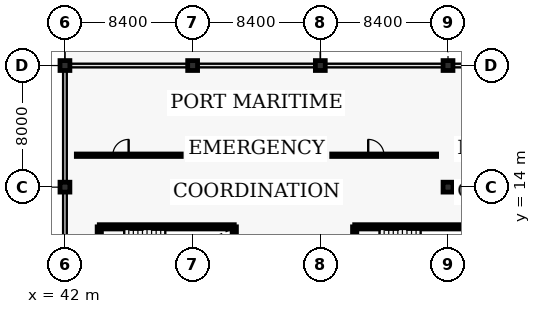
"""IFC4 building model, lengths in metres.
Left out: names, types, materials, properties, quantities, classifications, styles, units other than length and angle.
Written with IfcOpenShell. Run it as: python <this file> out.ifc"""

import sys

from ifc_helpers import new_model, si_unit, direction, frame, frame_2d, origin, origin_2d, place, context, subcontext, project, spatial, rectangle, extrude, element, fill, save


model = new_model("IFC4")
c1 = context("Model", 3, precision=1e-05, world=origin(), true_north=direction((0.0, 1.0)))
c2 = subcontext(c1, "Body", "Model", "MODEL_VIEW")
j1 = project(units=[si_unit("LENGTHUNIT", "METRE"), si_unit("PLANEANGLEUNIT", "RADIAN")], contexts=[c1])
p1 = place(None, origin())
s1 = spatial("IfcSite", under=j1, at=p1, CompositionType="ELEMENT")
p2 = place(p1, origin())
s2 = spatial("IfcBuilding", under=s1, at=p2, CompositionType="ELEMENT")
p3 = place(p2, frame((0.0, 0.0, 13.12)))
s3 = spatial("IfcBuildingStorey", under=s2, at=p3, CompositionType="ELEMENT", Elevation=13.12)
for number, where, z_axis, x_axis in (
    (1, (42.0, 14.0, 0.0), (0.0, 0.0, 1.0), (1.0, 0.0, 0.0)),
    (2, (42.0, 22.0, 0.0), (0.0, 0.0, 1.0), (1.0, 0.0, 0.0)),
    (3, (50.4, 14.0, 0.0), (0.0, 0.0, 1.0), (1.0, 0.0, 0.0)),
    (4, (50.4, 22.0, 0.0), (0.0, 0.0, 1.0), (1.0, 0.0, 0.0)),
    (5, (58.8, 14.0, 0.0), (0.0, 0.0, 1.0), (1.0, 0.0, 0.0)),
    (6, (58.8, 22.0, 0.0), (0.0, 0.0, 1.0), (1.0, 0.0, 0.0)),
    (7, (67.2, 14.0, 0.0), (0.0, 0.0, 1.0), (1.0, 0.0, 0.0)),
    (8, (67.2, 22.0, 0.0), (0.0, 0.0, 1.0), (1.0, 0.0, 0.0)),
):
    element("IfcColumn", number, at=place(p3, frame(where, z_axis=z_axis, x_axis=x_axis)), inside=s3, PredefinedType="COLUMN", context=c2, shape_type="SweptSolid", body=[
        extrude(rectangle(XDim=0.65, YDim=0.65, at=origin_2d()), origin(), (0.0, 0.0, 1.0), 3.2),
    ])
p4 = place(p3, frame((44.26, 11.39, 0.0), z_axis=(0.0, 0.0, 1.0), x_axis=(1.0, 0.0, 0.0)))
e9 = element("IfcWall", 9, at=p4, inside=s3, PredefinedType="SHEAR", context=c2, shape_type="SweptSolid", body=[
    extrude(rectangle(XDim=8.88, YDim=0.28, at=frame_2d((4.44, 0.0))), origin(), (0.0, 0.0, 1.0), 3.2),
])
p5 = place(p3, frame((44.26, 11.39, 0.0), z_axis=(0.0, 0.0, 1.0), x_axis=(0.0, -1.0, 0.0)))
e10 = element("IfcWall", 10, at=p5, inside=s3, PredefinedType="SHEAR", context=c2, shape_type="SweptSolid", body=[
    extrude(rectangle(XDim=3.43, YDim=0.28, at=frame_2d((1.715, 0.0))), origin(), (0.0, 0.0, 1.0), 3.2),
])
p6 = place(p5, frame((1.035, 0.0, 0.0)))
e11 = element("IfcOpeningElement", 11, at=p6, cuts=e10, PredefinedType="OPENING", context=c2, shape_type="SweptSolid", body=[
    extrude(rectangle(XDim=1.36, YDim=2.15, at=frame_2d((0.68, 1.075))), frame((0.0, 0.15, 0.0), z_axis=(0.0, -1.0, 0.0), x_axis=(1.0, 0.0, 0.0)), (0.0, 0.0, 1.0), 0.3),
])
p7 = place(p3, frame((53.14, 7.96, 0.0), z_axis=(0.0, 0.0, 1.0), x_axis=(0.0, 1.0, 0.0)))
e12 = element("IfcWall", 12, at=p7, inside=s3, PredefinedType="SHEAR", context=c2, shape_type="SweptSolid", body=[
    extrude(rectangle(XDim=3.43, YDim=0.28, at=frame_2d((1.715, 0.0))), origin(), (0.0, 0.0, 1.0), 3.2),
])
p8 = place(p3, frame((61.06, 11.39, 0.0), z_axis=(0.0, 0.0, 1.0), x_axis=(1.0, 0.0, 0.0)))
e13 = element("IfcWall", 13, at=p8, inside=s3, PredefinedType="SHEAR", context=c2, shape_type="SweptSolid", body=[
    extrude(rectangle(XDim=8.88, YDim=0.28, at=frame_2d((4.44, 0.0))), origin(), (0.0, 0.0, 1.0), 3.2),
])
p9 = place(p3, frame((61.06, 11.39, 0.0), z_axis=(0.0, 0.0, 1.0), x_axis=(0.0, -1.0, 0.0)))
e14 = element("IfcWall", 14, at=p9, inside=s3, PredefinedType="SHEAR", context=c2, shape_type="SweptSolid", body=[
    extrude(rectangle(XDim=3.43, YDim=0.28, at=frame_2d((1.715, 0.0))), origin(), (0.0, 0.0, 1.0), 3.2),
])
p10 = place(p9, frame((1.075, 0.0, 0.0)))
e15 = element("IfcOpeningElement", 15, at=p10, cuts=e14, PredefinedType="OPENING", context=c2, shape_type="SweptSolid", body=[
    extrude(rectangle(XDim=1.28, YDim=2.1, at=frame_2d((0.64, 1.05))), frame((0.0, 0.15, 0.0), z_axis=(0.0, -1.0, 0.0), x_axis=(1.0, 0.0, 0.0)), (0.0, 0.0, 1.0), 0.3),
])
p11 = place(p3, frame((42.75, 16.1, 0.0), z_axis=(0.0, 0.0, 1.0), x_axis=(1.0, 0.0, 0.0)))
e16 = element("IfcWall", 16, at=p11, inside=s3, PredefinedType="PARTITIONING", context=c2, shape_type="SweptSolid", body=[
    extrude(rectangle(XDim=6.9, YDim=0.16, at=frame_2d((3.45, 0.0))), origin(), (0.0, 0.0, 1.0), 2.475),
])
p12 = place(p11, frame((2.4, 0.0, 0.0)))
e17 = element("IfcOpeningElement", 17, at=p12, cuts=e16, PredefinedType="OPENING", context=c2, shape_type="SweptSolid", body=[
    extrude(rectangle(XDim=1.04, YDim=2.14, at=frame_2d((0.52, 1.07))), frame((0.0, 0.09, 0.0), z_axis=(0.0, -1.0, 0.0), x_axis=(1.0, 0.0, 0.0)), (0.0, 0.0, 1.0), 0.18),
])
p13 = place(p3, frame((51.15, 16.1, 0.0), z_axis=(0.0, 0.0, 1.0), x_axis=(1.0, 0.0, 0.0)))
e18 = element("IfcWall", 18, at=p13, inside=s3, PredefinedType="PARTITIONING", context=c2, shape_type="SweptSolid", body=[
    extrude(rectangle(XDim=6.9, YDim=0.16, at=frame_2d((3.45, 0.0))), origin(), (0.0, 0.0, 1.0), 2.475),
])
p14 = place(p13, frame((2.4, 0.0, 0.0)))
e19 = element("IfcOpeningElement", 19, at=p14, cuts=e18, PredefinedType="OPENING", context=c2, shape_type="SweptSolid", body=[
    extrude(rectangle(XDim=1.04, YDim=2.14, at=frame_2d((0.52, 1.07))), frame((0.0, 0.09, 0.0), z_axis=(0.0, -1.0, 0.0), x_axis=(1.0, 0.0, 0.0)), (0.0, 0.0, 1.0), 0.18),
])
p15 = place(p3, frame((59.55, 16.1, 0.0), z_axis=(0.0, 0.0, 1.0), x_axis=(1.0, 0.0, 0.0)))
e20 = element("IfcWall", 20, at=p15, inside=s3, PredefinedType="PARTITIONING", context=c2, shape_type="SweptSolid", body=[
    extrude(rectangle(XDim=6.9, YDim=0.16, at=frame_2d((3.45, 0.0))), origin(), (0.0, 0.0, 1.0), 2.475),
])
p16 = place(p15, frame((2.4, 0.0, 0.0)))
e21 = element("IfcOpeningElement", 21, at=p16, cuts=e20, PredefinedType="OPENING", context=c2, shape_type="SweptSolid", body=[
    extrude(rectangle(XDim=1.04, YDim=2.14, at=frame_2d((0.52, 1.07))), frame((0.0, 0.09, 0.0), z_axis=(0.0, -1.0, 0.0), x_axis=(1.0, 0.0, 0.0)), (0.0, 0.0, 1.0), 0.18),
])
p17 = place(p3, frame((67.95, 16.1, 0.0), z_axis=(0.0, 0.0, 1.0), x_axis=(1.0, 0.0, 0.0)))
e22 = element("IfcWall", 22, at=p17, inside=s3, PredefinedType="PARTITIONING", context=c2, shape_type="SweptSolid", body=[
    extrude(rectangle(XDim=6.9, YDim=0.16, at=frame_2d((3.45, 0.0))), origin(), (0.0, 0.0, 1.0), 2.475),
])
p18 = place(p17, frame((2.4, 0.0, 0.0)))
e23 = element("IfcOpeningElement", 23, at=p18, cuts=e22, PredefinedType="OPENING", context=c2, shape_type="SweptSolid", body=[
    extrude(rectangle(XDim=1.04, YDim=2.14, at=frame_2d((0.52, 1.07))), frame((0.0, 0.09, 0.0), z_axis=(0.0, -1.0, 0.0), x_axis=(1.0, 0.0, 0.0)), (0.0, 0.0, 1.0), 0.18),
])
p19 = place(p12, origin())
e24 = element("IfcDoor", 24, at=p19, inside=s3, OperationType="SINGLE_SWING_RIGHT", PredefinedType="DOOR", context=c2, shape_type="SweptSolid", body=[
    extrude(rectangle(XDim=1.04, YDim=2.14, at=frame_2d((0.52, 1.07))), frame((0.0, 0.025, 0.0), z_axis=(0.0, -1.0, 0.0), x_axis=(1.0, 0.0, 0.0)), (0.0, 0.0, 1.0), 0.05),
])
fill(e17, e24)
p20 = place(p14, origin())
e25 = element("IfcDoor", 25, at=p20, inside=s3, OperationType="SINGLE_SWING_RIGHT", PredefinedType="DOOR", context=c2, shape_type="SweptSolid", body=[
    extrude(rectangle(XDim=1.04, YDim=2.14, at=frame_2d((0.52, 1.07))), frame((0.0, 0.025, 0.0), z_axis=(0.0, -1.0, 0.0), x_axis=(1.0, 0.0, 0.0)), (0.0, 0.0, 1.0), 0.05),
])
fill(e19, e25)
p21 = place(p16, origin())
e26 = element("IfcDoor", 26, at=p21, inside=s3, OperationType="SINGLE_SWING_LEFT", PredefinedType="DOOR", context=c2, shape_type="SweptSolid", body=[
    extrude(rectangle(XDim=1.04, YDim=2.14, at=frame_2d((0.52, 1.07))), frame((0.0, 0.025, 0.0), z_axis=(0.0, -1.0, 0.0), x_axis=(1.0, 0.0, 0.0)), (0.0, 0.0, 1.0), 0.05),
])
fill(e21, e26)
save(model, sys.argv[1])
